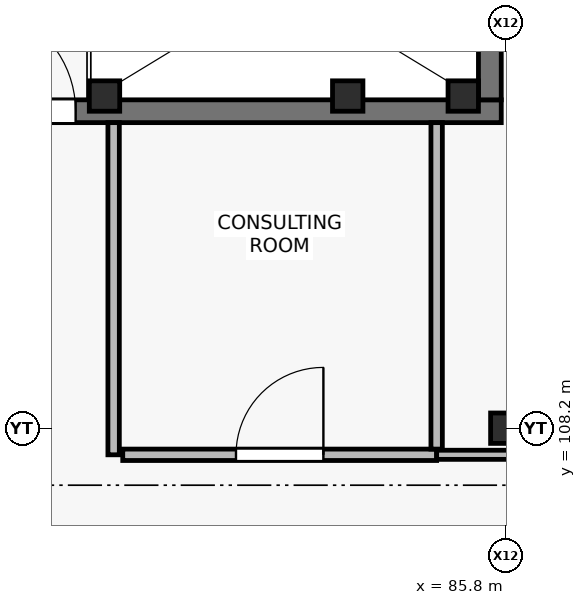
"""IFC4 building model, lengths in metres.
Left out: names, types, materials, properties, quantities, classifications, styles, units other than length and angle.
Written with IfcOpenShell. Run it as: python <this file> out.ifc"""

import sys

from ifc_helpers import new_model, si_unit, direction, frame, frame_2d, origin, origin_2d, place, context, subcontext, project, spatial, rectangle, extrude, element, fill, save


model = new_model("IFC4")
c1 = context("Model", 3, precision=1e-05, world=origin(), true_north=direction((0.0, 1.0)))
c2 = subcontext(c1, "Body", "Model", "MODEL_VIEW")
j1 = project(units=[si_unit("LENGTHUNIT", "METRE"), si_unit("PLANEANGLEUNIT", "RADIAN")], contexts=[c1])
p1 = place(None, origin())
s1 = spatial("IfcSite", under=j1, at=p1, CompositionType="ELEMENT")
p2 = place(p1, origin())
s2 = spatial("IfcBuilding", under=s1, at=p2, CompositionType="ELEMENT")
p3 = place(p2, frame((0.0, 0.0, 23.1)))
s3 = spatial("IfcBuildingStorey", under=s2, at=p3, CompositionType="ELEMENT", Elevation=23.1)
for number, where, z_axis, x_axis in (
    (1, (85.8, 108.2, 0.0), (0.0, 0.0, 1.0), (1.0, 0.0, 0.0)),
    (2, (80.52, 112.57, 0.0), (0.0, 0.0, 1.0), (1.0, 0.0, 0.0)),
    (3, (83.72, 112.57, 0.0), (0.0, 0.0, 1.0), (1.0, 0.0, 0.0)),
    (4, (85.24, 112.57, 0.0), (0.0, 0.0, 1.0), (1.0, 0.0, 0.0)),
):
    element("IfcColumn", number, at=place(p3, frame(where, z_axis=z_axis, x_axis=x_axis)), inside=s3, PredefinedType="COLUMN", context=c2, shape_type="SweptSolid", body=[
        extrude(rectangle(XDim=0.4, YDim=0.4, at=origin_2d()), origin(), (0.0, 0.0, 1.0), 4.2),
    ])
p4 = place(p3, frame((78.24, 112.37, 0.0), z_axis=(0.0, 0.0, 1.0), x_axis=(1.0, 0.0, 0.0)))
e5 = element("IfcWall", 5, at=p4, inside=s3, PredefinedType="SHEAR", context=c2, shape_type="SweptSolid", body=[
    extrude(rectangle(XDim=7.5, YDim=0.3, at=frame_2d((3.75, 0.0))), origin(), (0.0, 0.0, 1.0), 3.94),
])
p5 = place(p4, frame((0.5, 0.0, 0.0)))
e6 = element("IfcOpeningElement", 6, at=p5, cuts=e5, PredefinedType="OPENING", context=c2, shape_type="SweptSolid", body=[
    extrude(rectangle(XDim=1.4, YDim=2.2, at=frame_2d((0.7, 1.1))), frame((0.0, 0.16, 0.0), z_axis=(0.0, -1.0, 0.0), x_axis=(1.0, 0.0, 0.0)), (0.0, 0.0, 1.0), 0.32),
])
p6 = place(p3, frame((85.59, 112.52, 0.0), z_axis=(0.0, 0.0, 1.0), x_axis=(0.0, 1.0, 0.0)))
e7 = element("IfcWall", 7, at=p6, inside=s3, PredefinedType="SHEAR", context=c2, shape_type="SweptSolid", body=[
    extrude(rectangle(XDim=3.33, YDim=0.3, at=frame_2d((1.665, 0.0))), origin(), (0.0, 0.0, 1.0), 3.94),
])
p7 = place(p3, frame((80.64, 107.85, 0.0), z_axis=(0.0, 0.0, 1.0), x_axis=(0.0, 1.0, 0.0)))
e8 = element("IfcWall", 8, at=p7, inside=s3, PredefinedType="PARTITIONING", context=c2, shape_type="SweptSolid", body=[
    extrude(rectangle(XDim=4.37, YDim=0.15, at=frame_2d((2.185, 0.0))), origin(), (0.0, 0.0, 1.0), 3.94),
])
p8 = place(p3, frame((80.76, 107.85, 0.0), z_axis=(0.0, 0.0, 1.0), x_axis=(1.0, 0.0, 0.0)))
e9 = element("IfcWall", 9, at=p8, inside=s3, PredefinedType="PARTITIONING", context=c2, shape_type="SweptSolid", body=[
    extrude(rectangle(XDim=4.13, YDim=0.15, at=frame_2d((2.065, 0.0))), origin(), (0.0, 0.0, 1.0), 3.94),
])
p9 = place(p8, frame((1.49, 0.0, 0.0)))
e10 = element("IfcOpeningElement", 10, at=p9, cuts=e9, PredefinedType="OPENING", context=c2, shape_type="SweptSolid", body=[
    extrude(rectangle(XDim=1.15, YDim=2.2, at=frame_2d((0.575, 1.1))), frame((0.0, 0.085, 0.0), z_axis=(0.0, -1.0, 0.0), x_axis=(1.0, 0.0, 0.0)), (0.0, 0.0, 1.0), 0.17),
])
p10 = place(p3, frame((84.89, 107.85, 0.0), z_axis=(0.0, 0.0, 1.0), x_axis=(1.0, 0.0, 0.0)))
e11 = element("IfcWall", 11, at=p10, inside=s3, PredefinedType="PARTITIONING", context=c2, shape_type="SweptSolid", body=[
    extrude(rectangle(XDim=8.52, YDim=0.12, at=frame_2d((4.26, 0.0))), origin(), (0.0, 0.0, 1.0), 3.94),
])
p11 = place(p10, frame((3.66, 0.0, 0.0)))
e12 = element("IfcOpeningElement", 12, at=p11, cuts=e11, PredefinedType="OPENING", context=c2, shape_type="SweptSolid", body=[
    extrude(rectangle(XDim=1.2, YDim=2.2, at=frame_2d((0.6, 1.1))), frame((0.0, 0.07, 0.0), z_axis=(0.0, -1.0, 0.0), x_axis=(1.0, 0.0, 0.0)), (0.0, 0.0, 1.0), 0.14),
])
p12 = place(p3, frame((84.89, 107.925, 0.0), z_axis=(0.0, 0.0, 1.0), x_axis=(0.0, 1.0, 0.0)))
e13 = element("IfcWall", 13, at=p12, inside=s3, PredefinedType="PARTITIONING", context=c2, shape_type="SweptSolid", body=[
    extrude(rectangle(XDim=4.295, YDim=0.15, at=frame_2d((2.147, 0.0))), origin(), (0.0, 0.0, 1.0), 3.94),
])
p13 = place(p5, origin())
e14 = element("IfcDoor", 14, at=p13, inside=s3, OperationType="SINGLE_SWING_LEFT", PredefinedType="DOOR", context=c2, shape_type="SweptSolid", body=[
    extrude(rectangle(XDim=1.4, YDim=2.2, at=frame_2d((0.7, 1.1))), frame((0.0, 0.025, 0.0), z_axis=(0.0, -1.0, 0.0), x_axis=(1.0, 0.0, 0.0)), (0.0, 0.0, 1.0), 0.05),
])
fill(e6, e14)
p14 = place(p9, origin())
e15 = element("IfcDoor", 15, at=p14, inside=s3, OperationType="SINGLE_SWING_RIGHT", PredefinedType="DOOR", context=c2, shape_type="SweptSolid", body=[
    extrude(rectangle(XDim=1.15, YDim=2.2, at=frame_2d((0.575, 1.1))), frame((0.0, 0.025, 0.0), z_axis=(0.0, -1.0, 0.0), x_axis=(1.0, 0.0, 0.0)), (0.0, 0.0, 1.0), 0.05),
])
fill(e10, e15)
save(model, sys.argv[1])
